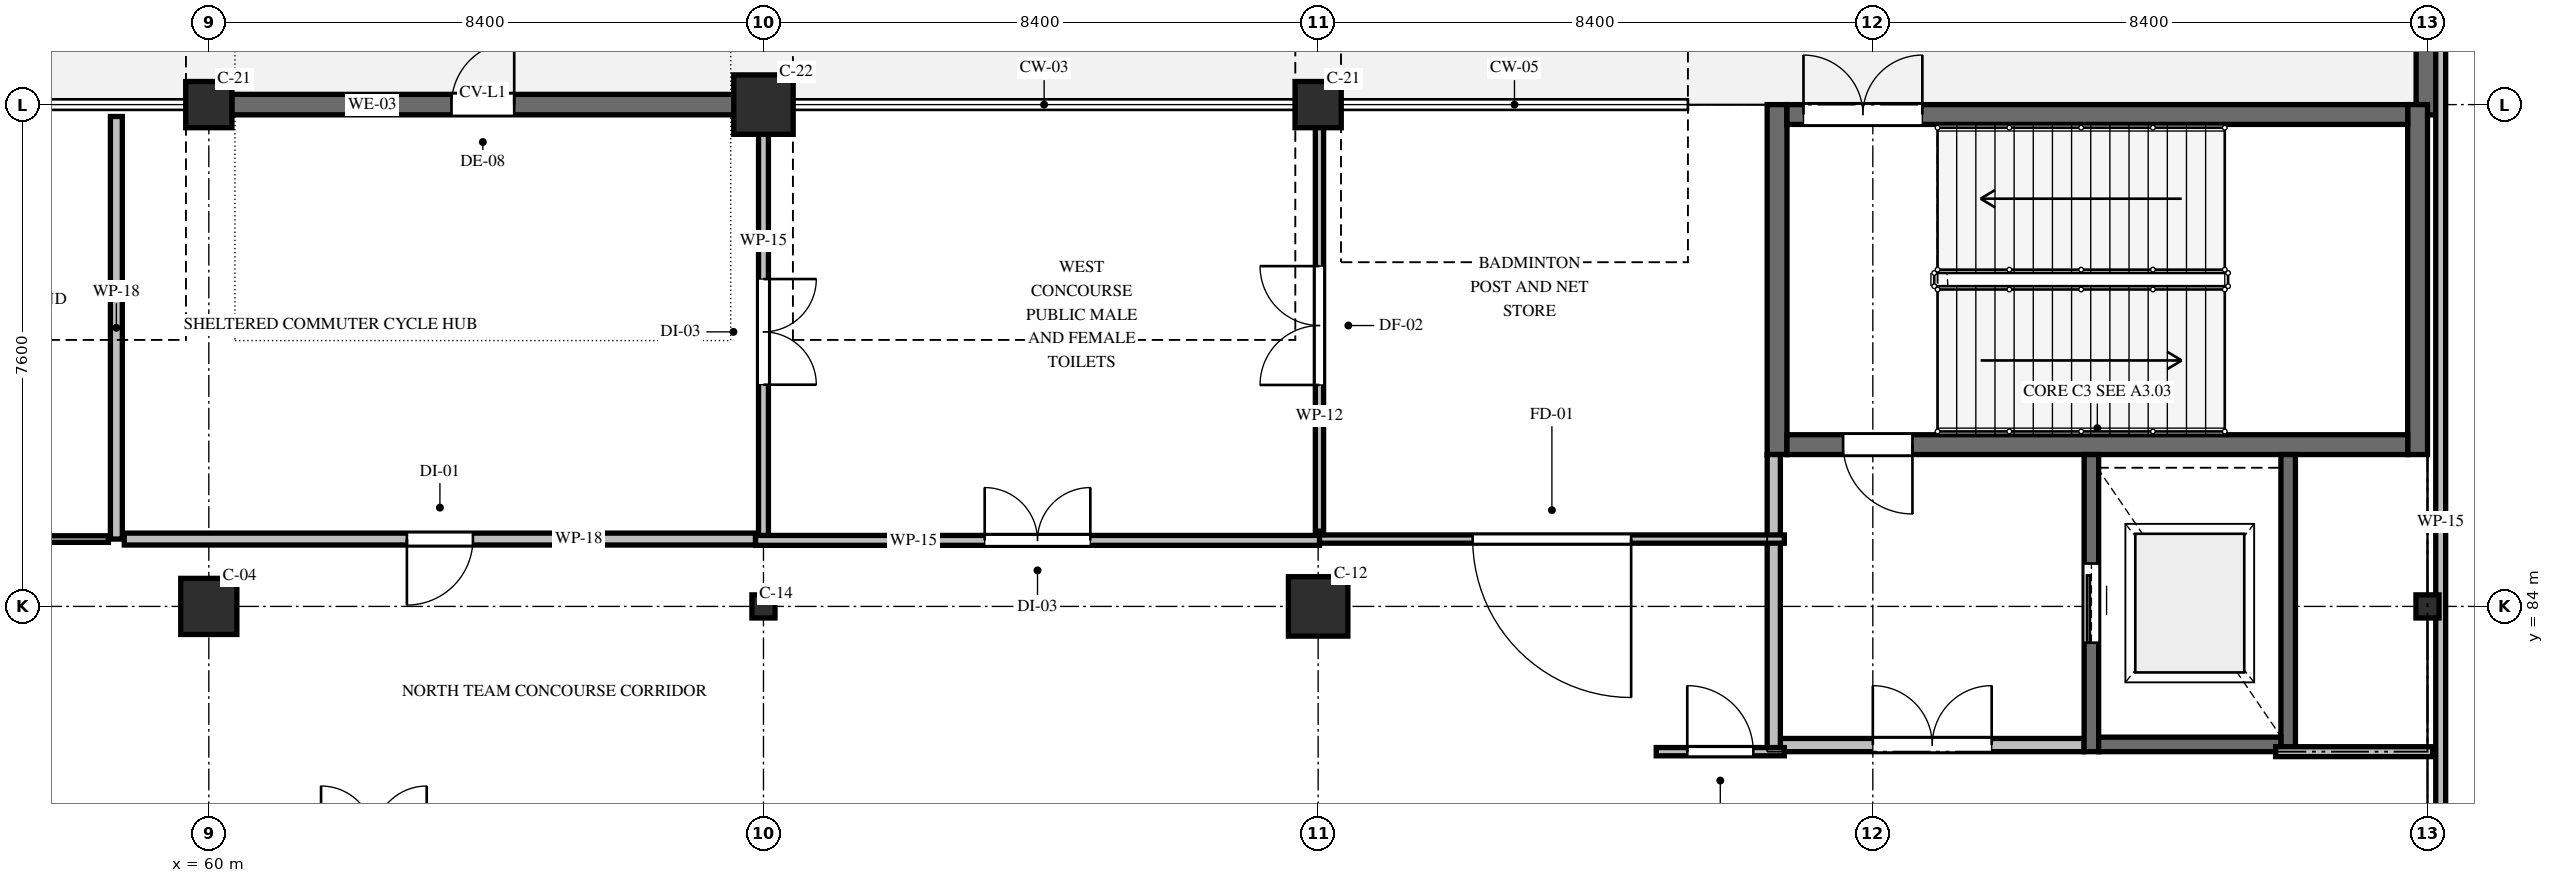
"""IFC4 building model, lengths in metres.
Left out: names, types, materials, properties, quantities, classifications, styles, units other than length and angle.
Written with IfcOpenShell. Run it as: python <this file> out.ifc"""

import sys

from ifc_helpers import new_model, si_unit, direction, frame, frame_2d, origin, origin_2d, place, context, subcontext, project, spatial, rectangle, hollow_rectangle, circle, i_section, extrude, element, fill, save


model = new_model("IFC4")
c1 = context("Model", 3, precision=1e-05, world=origin(), true_north=direction((0.0, 1.0)))
c2 = subcontext(c1, "Body", "Model", "MODEL_VIEW")
j1 = project(units=[si_unit("LENGTHUNIT", "METRE"), si_unit("PLANEANGLEUNIT", "RADIAN")], contexts=[c1])
p1 = place(None, origin())
s1 = spatial("IfcSite", under=j1, at=p1, CompositionType="ELEMENT")
p2 = place(p1, origin())
s2 = spatial("IfcBuilding", under=s1, at=p2, CompositionType="ELEMENT")
p3 = place(p2, origin())
s3 = spatial("IfcBuildingStorey", under=s2, at=p3, CompositionType="ELEMENT", Elevation=0.0)
p4 = place(p3, frame((60.0, 84.0, 0.0), z_axis=(0.0, 0.0, 1.0), x_axis=(1.0, 0.0, 0.0)))
e1 = element("IfcColumn", 1, at=p4, inside=s3, PredefinedType="COLUMN", context=c2, shape_type="SweptSolid", body=[
    extrude(rectangle(XDim=0.85, YDim=0.85, at=origin_2d()), origin(), (0.0, 0.0, 1.0), 5.4),
])
p5 = place(p3, frame((60.0, 91.6, 0.0), z_axis=(0.0, 0.0, 1.0), x_axis=(1.0, 0.0, 0.0)))
e2 = element("IfcColumn", 2, at=p5, inside=s3, PredefinedType="COLUMN", context=c2, shape_type="SweptSolid", body=[
    extrude(hollow_rectangle(XDim=0.7, YDim=0.7, WallThickness=0.028, InnerFilletRadius=0.028, OuterFilletRadius=0.056, at=origin_2d()), origin(), (0.0, 0.0, 1.0), 5.4),
])
p6 = place(p3, frame((68.4, 84.0, 0.0), z_axis=(0.0, 0.0, 1.0), x_axis=(1.0, 0.0, 0.0)))
e3 = element("IfcColumn", 3, at=p6, inside=s3, PredefinedType="COLUMN", context=c2, shape_type="SweptSolid", body=[
    extrude(i_section(OverallWidth=0.35, OverallDepth=0.35, WebThickness=0.012, FlangeThickness=0.019, FilletRadius=0.013, at=origin_2d()), origin(), (0.0, 0.0, 1.0), 5.4),
])
p7 = place(p3, frame((68.4, 91.6, 0.0), z_axis=(0.0, 0.0, 1.0), x_axis=(1.0, 0.0, 0.0)))
e4 = element("IfcColumn", 4, at=p7, inside=s3, PredefinedType="COLUMN", context=c2, shape_type="SweptSolid", body=[
    extrude(hollow_rectangle(XDim=0.9, YDim=0.9, WallThickness=0.036, InnerFilletRadius=0.036, OuterFilletRadius=0.072, at=origin_2d()), origin(), (0.0, 0.0, 1.0), 5.4),
])
p8 = place(p3, frame((76.8, 84.0, 0.0), z_axis=(0.0, 0.0, 1.0), x_axis=(1.0, 0.0, 0.0)))
e5 = element("IfcColumn", 5, at=p8, inside=s3, PredefinedType="COLUMN", context=c2, shape_type="SweptSolid", body=[
    extrude(circle(Radius=0.45, at=origin_2d()), origin(), (0.0, 0.0, 1.0), 5.4),
])
p9 = place(p3, frame((76.8, 91.6, 0.0), z_axis=(0.0, 0.0, 1.0), x_axis=(1.0, 0.0, 0.0)))
e6 = element("IfcColumn", 6, at=p9, inside=s3, PredefinedType="COLUMN", context=c2, shape_type="SweptSolid", body=[
    extrude(hollow_rectangle(XDim=0.7, YDim=0.7, WallThickness=0.028, InnerFilletRadius=0.028, OuterFilletRadius=0.056, at=origin_2d()), origin(), (0.0, 0.0, 1.0), 5.4),
])
p10 = place(p3, frame((93.6, 84.0, 0.0), z_axis=(0.0, 0.0, 1.0), x_axis=(1.0, 0.0, 0.0)))
e7 = element("IfcColumn", 7, at=p10, inside=s3, PredefinedType="COLUMN", context=c2, shape_type="SweptSolid", body=[
    extrude(i_section(OverallWidth=0.35, OverallDepth=0.35, WebThickness=0.012, FlangeThickness=0.019, FilletRadius=0.013, at=origin_2d()), origin(), (0.0, 0.0, 1.0), 5.4),
])
p11 = place(p3, frame((60.346, 91.6, 0.0), z_axis=(0.0, 0.0, 1.0), x_axis=(1.0, 0.0, 0.0)))
e8 = element("IfcWall", 8, at=p11, inside=s3, PredefinedType="SOLIDWALL", context=c2, shape_type="SweptSolid", body=[
    extrude(rectangle(XDim=7.608, YDim=0.31, at=frame_2d((3.804, 0.0))), origin(), (0.0, 0.0, 1.0), 4.218),
])
p12 = place(p11, frame((3.329, 0.0, 0.0)))
e9 = element("IfcOpeningElement", 9, at=p12, cuts=e8, PredefinedType="OPENING", context=c2, shape_type="SweptSolid", body=[
    extrude(rectangle(XDim=0.95, YDim=2.15, at=frame_2d((0.475, 1.075))), frame((0.0, 0.165, 0.0), z_axis=(0.0, -1.0, 0.0), x_axis=(1.0, 0.0, 0.0)), (0.0, 0.0, 1.0), 0.33),
])
p13 = place(p3, frame((93.6, 91.444, 0.0), z_axis=(0.0, 0.0, 1.0), x_axis=(0.0, 1.0, 0.0)))
e10 = element("IfcWall", 10, at=p13, inside=s3, PredefinedType="SOLIDWALL", context=c2, shape_type="SweptSolid", body=[
    extrude(rectangle(XDim=7.21, YDim=0.345, at=frame_2d((3.605, 0.0))), origin(), (0.0, 0.0, 1.0), 4.368),
])
p14 = place(p13, frame((2.605, 0.0, 0.0)))
e11 = element("IfcOpeningElement", 11, at=p14, cuts=e10, PredefinedType="OPENING", context=c2, shape_type="SweptSolid", body=[
    extrude(rectangle(XDim=2.0, YDim=2.3, at=frame_2d((1.0, 1.15))), frame((0.0, 0.182, 0.0), z_axis=(0.0, -1.0, 0.0), x_axis=(1.0, 0.0, 0.0)), (0.0, 0.0, 1.0), 0.365),
])
for number, where, z_axis, x_axis in (
    (12, (83.75, 86.3, 0.0), (0.0, 0.0, 1.0), (0.0, 1.0, 0.0)),
    (13, (93.45, 91.6, 0.0), (0.0, 0.0, 1.0), (0.0, -1.0, 0.0)),
):
    element("IfcWall", number, at=place(p3, frame(where, z_axis=z_axis, x_axis=x_axis)), inside=s3, PredefinedType="SHEAR", context=c2, shape_type="SweptSolid", body=[
        extrude(rectangle(XDim=5.3, YDim=0.3, at=frame_2d((2.65, 0.0))), origin(), (0.0, 0.0, 1.0), 5.17),
    ])
p15 = place(p3, frame((93.3, 86.45, 0.0), z_axis=(0.0, 0.0, 1.0), x_axis=(-1.0, 0.0, 0.0)))
e14 = element("IfcWall", 14, at=p15, inside=s3, PredefinedType="SHEAR", context=c2, shape_type="SweptSolid", body=[
    extrude(rectangle(XDim=9.4, YDim=0.3, at=frame_2d((4.7, 0.0))), origin(), (0.0, 0.0, 1.0), 5.17),
])
p16 = place(p15, frame((7.5, 0.0, 0.0)))
e15 = element("IfcOpeningElement", 15, at=p16, cuts=e14, PredefinedType="OPENING", context=c2, shape_type="SweptSolid", body=[
    extrude(rectangle(XDim=1.05, YDim=2.2, at=frame_2d((0.525, 1.1))), frame((0.0, 0.16, 0.0), z_axis=(0.0, -1.0, 0.0), x_axis=(1.0, 0.0, 0.0)), (0.0, 0.0, 1.0), 0.32),
])
p17 = place(p3, frame((83.9, 91.45, 0.0), z_axis=(0.0, 0.0, 1.0), x_axis=(1.0, 0.0, 0.0)))
e16 = element("IfcWall", 16, at=p17, inside=s3, PredefinedType="SHEAR", context=c2, shape_type="SweptSolid", body=[
    extrude(rectangle(XDim=9.4, YDim=0.3, at=frame_2d((4.7, 0.0))), origin(), (0.0, 0.0, 1.0), 5.17),
])
p18 = place(p17, frame((0.25, 0.0, 0.0)))
e17 = element("IfcOpeningElement", 17, at=p18, cuts=e16, PredefinedType="OPENING", context=c2, shape_type="SweptSolid", body=[
    extrude(rectangle(XDim=1.8, YDim=2.25, at=frame_2d((0.9, 1.125))), frame((0.0, 0.16, 0.0), z_axis=(0.0, -1.0, 0.0), x_axis=(1.0, 0.0, 0.0)), (0.0, 0.0, 1.0), 0.32),
])
p19 = place(p3, frame((83.8, 81.9, 0.0), z_axis=(0.0, 0.0, 1.0), x_axis=(1.0, 0.0, 0.0)))
e18 = element("IfcWall", 18, at=p19, inside=s3, PredefinedType="SOLIDWALL", context=c2, shape_type="SweptSolid", body=[
    extrude(rectangle(XDim=4.6, YDim=0.2, at=frame_2d((2.3, 0.0))), origin(), (0.0, 0.0, 1.0), 4.37),
])
p20 = place(p19, frame((1.4, 0.0, 0.0)))
e19 = element("IfcOpeningElement", 19, at=p20, cuts=e18, PredefinedType="OPENING", context=c2, shape_type="SweptSolid", body=[
    extrude(rectangle(XDim=1.8, YDim=2.2, at=frame_2d((0.9, 1.1))), frame((0.0, 0.11, 0.0), z_axis=(0.0, -1.0, 0.0), x_axis=(1.0, 0.0, 0.0)), (0.0, 0.0, 1.0), 0.22),
])
p21 = place(p3, frame((83.7, 81.8, 0.0), z_axis=(0.0, 0.0, 1.0), x_axis=(0.0, 1.0, 0.0)))
e20 = element("IfcWall", 20, at=p21, inside=s3, PredefinedType="SOLIDWALL", context=c2, shape_type="SweptSolid", body=[
    extrude(rectangle(XDim=4.5, YDim=0.2, at=frame_2d((2.25, 0.0))), origin(), (0.0, 0.0, 1.0), 4.37),
])
p22 = place(p3, frame((88.51, 81.8, 0.0), z_axis=(0.0, 0.0, 1.0), x_axis=(0.0, 1.0, 0.0)))
e21 = element("IfcWall", 21, at=p22, inside=s3, PredefinedType="SOLIDWALL", context=c2, shape_type="SweptSolid", body=[
    extrude(rectangle(XDim=4.5, YDim=0.22, at=frame_2d((2.25, 0.0))), origin(), (0.0, 0.0, 1.0), 5.17),
])
p23 = place(p22, frame((1.65, 0.0, 0.0)))
e22 = element("IfcOpeningElement", 22, at=p23, cuts=e21, PredefinedType="OPENING", context=c2, shape_type="SweptSolid", body=[
    extrude(rectangle(XDim=1.2, YDim=2.2, at=frame_2d((0.6, 1.1))), frame((0.0, 0.12, 0.0), z_axis=(0.0, -1.0, 0.0), x_axis=(1.0, 0.0, 0.0)), (0.0, 0.0, 1.0), 0.24),
])
p24 = place(p3, frame((91.49, 81.8, 0.0), z_axis=(0.0, 0.0, 1.0), x_axis=(0.0, 1.0, 0.0)))
e23 = element("IfcWall", 23, at=p24, inside=s3, PredefinedType="SOLIDWALL", context=c2, shape_type="SweptSolid", body=[
    extrude(rectangle(XDim=4.5, YDim=0.22, at=frame_2d((2.25, 0.0))), origin(), (0.0, 0.0, 1.0), 5.17),
])
p25 = place(p3, frame((88.62, 81.91, 0.0), z_axis=(0.0, 0.0, 1.0), x_axis=(1.0, 0.0, 0.0)))
e24 = element("IfcWall", 24, at=p25, inside=s3, PredefinedType="SOLIDWALL", context=c2, shape_type="SweptSolid", body=[
    extrude(rectangle(XDim=2.76, YDim=0.22, at=frame_2d((1.38, 0.0))), origin(), (0.0, 0.0, 1.0), 5.17),
])
p26 = place(p3, frame((58.6, 91.42, 0.0), z_axis=(0.0, 0.0, 1.0), x_axis=(0.0, -1.0, 0.0)))
e25 = element("IfcWall", 25, at=p26, inside=s3, PredefinedType="PARTITIONING", context=c2, shape_type="SweptSolid", body=[
    extrude(rectangle(XDim=6.4, YDim=0.18, at=frame_2d((3.2, 0.0))), origin(), (0.0, 0.0, 1.0), 4.47),
])
p27 = place(p3, frame((58.48, 85.02, 0.0), z_axis=(0.0, 0.0, 1.0), x_axis=(-1.0, 0.0, 0.0)))
e26 = element("IfcWall", 26, at=p27, inside=s3, PredefinedType="PARTITIONING", context=c2, shape_type="SweptSolid", body=[
    extrude(rectangle(XDim=13.94, YDim=0.1, at=frame_2d((6.97, 0.0))), origin(), (0.0, 0.0, 1.0), 4.388),
])
p28 = place(p27, frame((7.344, 0.0, 0.0)))
e27 = element("IfcOpeningElement", 27, at=p28, cuts=e26, PredefinedType="OPENING", context=c2, shape_type="SweptSolid", body=[
    extrude(rectangle(XDim=1.0, YDim=2.15, at=frame_2d((0.5, 1.075))), frame((0.0, 0.06, 0.0), z_axis=(0.0, -1.0, 0.0), x_axis=(1.0, 0.0, 0.0)), (0.0, 0.0, 1.0), 0.12),
])
p29 = place(p3, frame((68.4, 91.296, 0.0), z_axis=(0.0, 0.0, 1.0), x_axis=(0.0, -1.0, 0.0)))
e28 = element("IfcWall", 28, at=p29, inside=s3, PredefinedType="PARTITIONING", context=c2, shape_type="SweptSolid", body=[
    extrude(rectangle(XDim=6.276, YDim=0.15, at=frame_2d((3.138, 0.0))), origin(), (0.0, 0.0, 1.0), 4.382),
])
p30 = place(p29, frame((2.338, 0.0, 0.0)))
e29 = element("IfcOpeningElement", 29, at=p30, cuts=e28, PredefinedType="OPENING", context=c2, shape_type="SweptSolid", body=[
    extrude(rectangle(XDim=1.6, YDim=2.2, at=frame_2d((0.8, 1.1))), frame((0.0, 0.085, 0.0), z_axis=(0.0, -1.0, 0.0), x_axis=(1.0, 0.0, 0.0)), (0.0, 0.0, 1.0), 0.17),
])
p31 = place(p3, frame((68.28, 85.02, 0.0), z_axis=(0.0, 0.0, 1.0), x_axis=(-1.0, 0.0, 0.0)))
e30 = element("IfcWall", 30, at=p31, inside=s3, PredefinedType="PARTITIONING", context=c2, shape_type="SweptSolid", body=[
    extrude(rectangle(XDim=9.56, YDim=0.18, at=frame_2d((4.78, 0.0))), origin(), (0.0, 0.0, 1.0), 4.08),
])
p32 = place(p31, frame((4.28, 0.0, 0.0)))
e31 = element("IfcOpeningElement", 31, at=p32, cuts=e30, PredefinedType="OPENING", context=c2, shape_type="SweptSolid", body=[
    extrude(rectangle(XDim=1.0, YDim=2.15, at=frame_2d((0.5, 1.075))), frame((0.0, 0.1, 0.0), z_axis=(0.0, -1.0, 0.0), x_axis=(1.0, 0.0, 0.0)), (0.0, 0.0, 1.0), 0.2),
])
p33 = place(p3, frame((83.86, 85.02, 0.0), z_axis=(0.0, 0.0, 1.0), x_axis=(-1.0, 0.0, 0.0)))
e32 = element("IfcWall", 32, at=p33, inside=s3, PredefinedType="PARTITIONING", context=c2, shape_type="SweptSolid", body=[
    extrude(rectangle(XDim=7.04, YDim=0.125, at=frame_2d((3.52, 0.0))), origin(), (0.0, 0.0, 1.0), 4.17),
])
p34 = place(p33, frame((2.32, 0.0, 0.0)))
e33 = element("IfcOpeningElement", 33, at=p34, cuts=e32, PredefinedType="OPENING", context=c2, shape_type="SweptSolid", body=[
    extrude(rectangle(XDim=2.4, YDim=2.3, at=frame_2d((1.2, 1.15))), frame((0.0, 0.073, 0.0), z_axis=(0.0, -1.0, 0.0), x_axis=(1.0, 0.0, 0.0)), (0.0, 0.0, 1.0), 0.145),
])
p35 = place(p3, frame((76.82, 85.14, 0.0), z_axis=(0.0, 0.0, 1.0), x_axis=(0.0, 1.0, 0.0)))
e34 = element("IfcWall", 34, at=p35, inside=s3, PredefinedType="PARTITIONING", context=c2, shape_type="SweptSolid", body=[
    extrude(rectangle(XDim=6.228, YDim=0.125, at=frame_2d((3.114, 0.0))), origin(), (0.0, 0.0, 1.0), 4.17),
])
p36 = place(p35, frame((2.214, 0.0, 0.0)))
e35 = element("IfcOpeningElement", 35, at=p36, cuts=e34, PredefinedType="OPENING", context=c2, shape_type="SweptSolid", body=[
    extrude(rectangle(XDim=1.8, YDim=2.2, at=frame_2d((0.9, 1.1))), frame((0.0, 0.073, 0.0), z_axis=(0.0, -1.0, 0.0), x_axis=(1.0, 0.0, 0.0)), (0.0, 0.0, 1.0), 0.145),
])
p37 = place(p3, frame((93.8, 63.517, 0.0), z_axis=(0.0, 0.0, 1.0), x_axis=(0.0, 1.0, 0.0)))
e36 = element("IfcWall", 36, at=p37, inside=s3, PredefinedType="PARTITIONING", context=c2, shape_type="SweptSolid", body=[
    extrude(rectangle(XDim=30.233, YDim=0.15, at=frame_2d((15.116, 0.0))), origin(), (0.0, 0.0, 1.0), 4.27),
])
p38 = place(p37, frame((14.316, 0.0, 0.0)))
e37 = element("IfcOpeningElement", 37, at=p38, cuts=e36, PredefinedType="OPENING", context=c2, shape_type="SweptSolid", body=[
    extrude(rectangle(XDim=1.6, YDim=2.2, at=frame_2d((0.8, 1.1))), frame((0.0, 0.085, 0.0), z_axis=(0.0, -1.0, 0.0), x_axis=(1.0, 0.0, 0.0)), (0.0, 0.0, 1.0), 0.17),
])
p39 = place(p3, frame((91.3, 81.8, 0.0), z_axis=(0.0, 0.0, 1.0), x_axis=(1.0, 0.0, 0.0)))
e38 = element("IfcWall", 38, at=p39, inside=s3, PredefinedType="PARTITIONING", context=c2, shape_type="SweptSolid", body=[
    extrude(rectangle(XDim=2.38, YDim=0.15, at=frame_2d((1.19, 0.0))), origin(), (0.0, 0.0, 1.0), 4.47),
])
p40 = place(p3, frame((81.92, 81.8, 0.0), z_axis=(0.0, 0.0, 1.0), x_axis=(1.0, 0.0, 0.0)))
e39 = element("IfcWall", 39, at=p40, inside=s3, PredefinedType="PARTITIONING", context=c2, shape_type="SweptSolid", body=[
    extrude(rectangle(XDim=1.94, YDim=0.125, at=frame_2d((0.97, 0.0))), origin(), (0.0, 0.0, 1.0), 5.05),
])
p41 = place(p40, frame((0.47, 0.0, 0.0)))
e40 = element("IfcOpeningElement", 40, at=p41, cuts=e39, PredefinedType="OPENING", context=c2, shape_type="SweptSolid", body=[
    extrude(rectangle(XDim=1.0, YDim=2.15, at=frame_2d((0.5, 1.075))), frame((0.0, 0.073, 0.0), z_axis=(0.0, -1.0, 0.0), x_axis=(1.0, 0.0, 0.0)), (0.0, 0.0, 1.0), 0.145),
])
p42 = place(p3, frame((68.28, 85.0, 0.0), z_axis=(0.0, 0.0, 1.0), x_axis=(1.0, 0.0, 0.0)))
e41 = element("IfcWall", 41, at=p42, inside=s3, PredefinedType="PARTITIONING", context=c2, shape_type="SweptSolid", body=[
    extrude(rectangle(XDim=8.54, YDim=0.15, at=frame_2d((4.27, 0.0))), origin(), (0.0, 0.0, 1.0), 4.17),
])
p43 = place(p42, frame((3.47, 0.0, 0.0)))
e42 = element("IfcOpeningElement", 42, at=p43, cuts=e41, PredefinedType="OPENING", context=c2, shape_type="SweptSolid", body=[
    extrude(rectangle(XDim=1.6, YDim=2.2, at=frame_2d((0.8, 1.1))), frame((0.0, 0.085, 0.0), z_axis=(0.0, -1.0, 0.0), x_axis=(1.0, 0.0, 0.0)), (0.0, 0.0, 1.0), 0.17),
])
p44 = place(p12, origin())
e43 = element("IfcDoor", 43, at=p44, inside=s3, OperationType="SINGLE_SWING_RIGHT", PredefinedType="DOOR", context=c2, shape_type="SweptSolid", body=[
    extrude(rectangle(XDim=0.95, YDim=2.15, at=frame_2d((0.475, 1.075))), frame((0.0, 0.025, 0.0), z_axis=(0.0, -1.0, 0.0), x_axis=(1.0, 0.0, 0.0)), (0.0, 0.0, 1.0), 0.05),
])
fill(e9, e43)
p45 = place(p16, origin())
e44 = element("IfcDoor", 44, at=p45, inside=s3, OperationType="SINGLE_SWING_LEFT", PredefinedType="DOOR", context=c2, shape_type="SweptSolid", body=[
    extrude(rectangle(XDim=1.05, YDim=2.2, at=frame_2d((0.525, 1.1))), frame((0.0, 0.025, 0.0), z_axis=(0.0, -1.0, 0.0), x_axis=(1.0, 0.0, 0.0)), (0.0, 0.0, 1.0), 0.05),
])
fill(e15, e44)
p46 = place(p18, origin())
e45 = element("IfcDoor", 45, at=p46, inside=s3, OperationType="DOUBLE_DOOR_SINGLE_SWING", PredefinedType="DOOR", context=c2, shape_type="SweptSolid", body=[
    extrude(rectangle(XDim=1.8, YDim=2.25, at=frame_2d((0.9, 1.125))), frame((0.0, 0.025, 0.0), z_axis=(0.0, -1.0, 0.0), x_axis=(1.0, 0.0, 0.0)), (0.0, 0.0, 1.0), 0.05),
])
fill(e17, e45)
p47 = place(p20, origin())
e46 = element("IfcDoor", 46, at=p47, inside=s3, OperationType="DOUBLE_DOOR_SINGLE_SWING", PredefinedType="DOOR", context=c2, shape_type="SweptSolid", body=[
    extrude(rectangle(XDim=1.8, YDim=2.2, at=frame_2d((0.9, 1.1))), frame((0.0, 0.025, 0.0), z_axis=(0.0, -1.0, 0.0), x_axis=(1.0, 0.0, 0.0)), (0.0, 0.0, 1.0), 0.05),
])
fill(e19, e46)
p48 = place(p23, origin())
e47 = element("IfcDoor", 47, at=p48, inside=s3, OperationType="SLIDING_TO_LEFT", PredefinedType="DOOR", context=c2, shape_type="SweptSolid", body=[
    extrude(rectangle(XDim=1.2, YDim=2.2, at=frame_2d((0.6, 1.1))), frame((0.0, 0.025, 0.0), z_axis=(0.0, -1.0, 0.0), x_axis=(1.0, 0.0, 0.0)), (0.0, 0.0, 1.0), 0.05),
])
fill(e22, e47)
p49 = place(p32, origin())
e48 = element("IfcDoor", 48, at=p49, inside=s3, OperationType="SINGLE_SWING_RIGHT", PredefinedType="DOOR", context=c2, shape_type="SweptSolid", body=[
    extrude(rectangle(XDim=1.0, YDim=2.15, at=frame_2d((0.5, 1.075))), frame((0.0, 0.025, 0.0), z_axis=(0.0, -1.0, 0.0), x_axis=(1.0, 0.0, 0.0)), (0.0, 0.0, 1.0), 0.05),
])
fill(e31, e48)
p50 = place(p34, origin())
e49 = element("IfcDoor", 49, at=p50, inside=s3, OperationType="FOLDING_TO_LEFT", PredefinedType="DOOR", context=c2, shape_type="SweptSolid", body=[
    extrude(rectangle(XDim=2.4, YDim=2.3, at=frame_2d((1.2, 1.15))), frame((0.0, 0.025, 0.0), z_axis=(0.0, -1.0, 0.0), x_axis=(1.0, 0.0, 0.0)), (0.0, 0.0, 1.0), 0.05),
])
fill(e33, e49)
p51 = place(p43, origin())
e50 = element("IfcDoor", 50, at=p51, inside=s3, OperationType="DOUBLE_DOOR_SINGLE_SWING", PredefinedType="DOOR", context=c2, shape_type="SweptSolid", body=[
    extrude(rectangle(XDim=1.6, YDim=2.2, at=frame_2d((0.8, 1.1))), frame((0.0, 0.025, 0.0), z_axis=(0.0, -1.0, 0.0), x_axis=(1.0, 0.0, 0.0)), (0.0, 0.0, 1.0), 0.05),
])
fill(e42, e50)
p52 = place(p30, origin())
e51 = element("IfcDoor", 51, at=p52, inside=s3, OperationType="DOUBLE_DOOR_SINGLE_SWING", PredefinedType="DOOR", context=c2, shape_type="SweptSolid", body=[
    extrude(rectangle(XDim=1.6, YDim=2.2, at=frame_2d((0.8, 1.1))), frame((0.0, 0.025, 0.0), z_axis=(0.0, -1.0, 0.0), x_axis=(1.0, 0.0, 0.0)), (0.0, 0.0, 1.0), 0.05),
])
fill(e29, e51)
p53 = place(p36, origin())
e52 = element("IfcDoor", 52, at=p53, inside=s3, OperationType="DOUBLE_DOOR_SINGLE_SWING", PredefinedType="DOOR", context=c2, shape_type="SweptSolid", body=[
    extrude(rectangle(XDim=1.8, YDim=2.2, at=frame_2d((0.9, 1.1))), frame((0.0, 0.025, 0.0), z_axis=(0.0, -1.0, 0.0), x_axis=(1.0, 0.0, 0.0)), (0.0, 0.0, 1.0), 0.05),
])
fill(e35, e52)
p54 = place(p41, origin())
e53 = element("IfcDoor", 53, at=p54, inside=s3, OperationType="SINGLE_SWING_LEFT", PredefinedType="DOOR", context=c2, shape_type="SweptSolid", body=[
    extrude(rectangle(XDim=1.0, YDim=2.15, at=frame_2d((0.5, 1.075))), frame((0.0, 0.025, 0.0), z_axis=(0.0, -1.0, 0.0), x_axis=(1.0, 0.0, 0.0)), (0.0, 0.0, 1.0), 0.05),
])
fill(e40, e53)
save(model, sys.argv[1])
